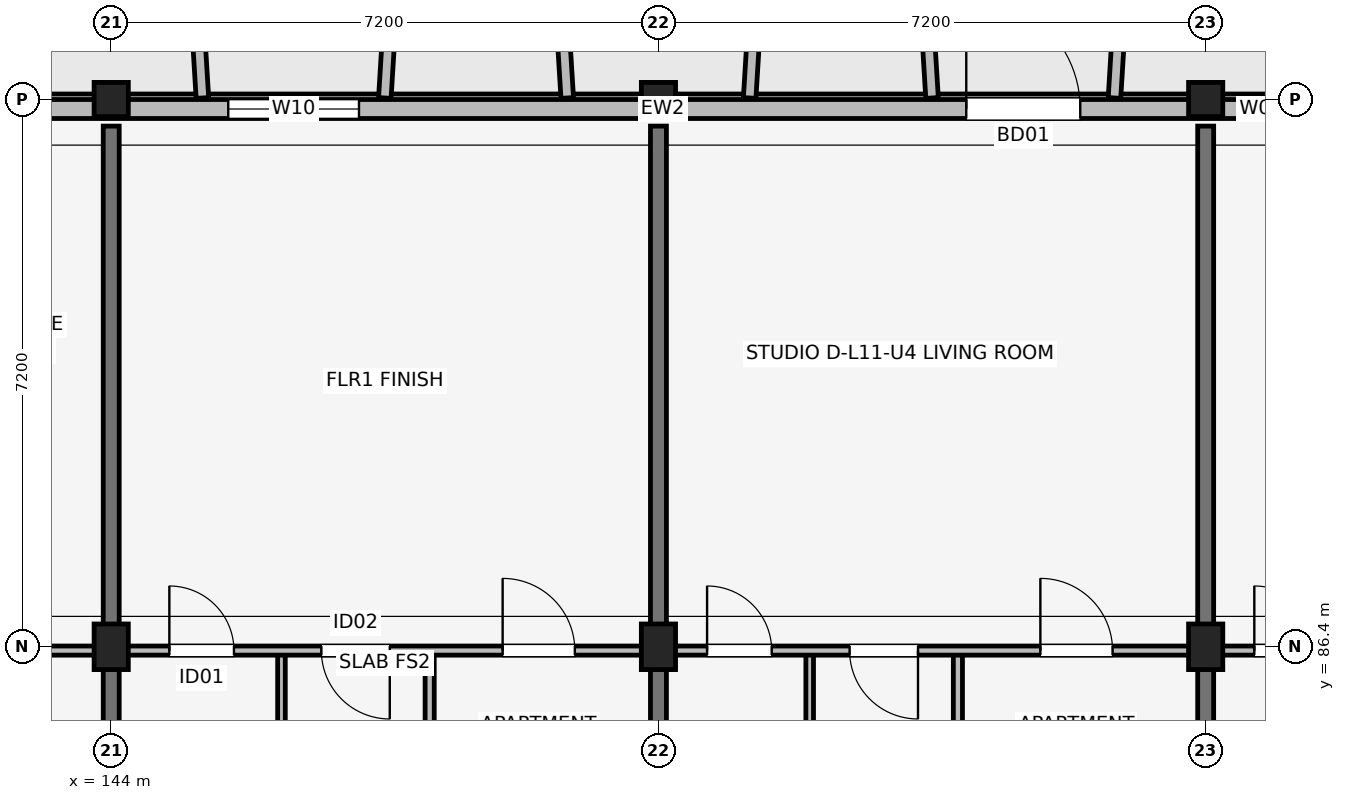
"""IFC4 building model, lengths in metres.
Left out: names, types, materials, properties, quantities, classifications, styles, units other than length and angle.
Written with IfcOpenShell. Run it as: python <this file> out.ifc"""

import sys

from ifc_helpers import new_model, si_unit, direction, frame, frame_2d, origin, origin_2d, place, context, subcontext, project, spatial, rectangle, extrude, element, fill, save


model = new_model("IFC4")
c1 = context("Model", 3, precision=1e-05, world=origin(), true_north=direction((0.0, 1.0)))
c2 = subcontext(c1, "Body", "Model", "MODEL_VIEW")
j1 = project(units=[si_unit("LENGTHUNIT", "METRE"), si_unit("PLANEANGLEUNIT", "RADIAN")], contexts=[c1])
p1 = place(None, origin())
s1 = spatial("IfcSite", under=j1, at=p1, CompositionType="ELEMENT")
p2 = place(p1, origin())
s2 = spatial("IfcBuilding", under=s1, at=p2, CompositionType="ELEMENT")
p3 = place(p2, frame((0.0, 0.0, 37.05)))
s3 = spatial("IfcBuildingStorey", under=s2, at=p3, CompositionType="ELEMENT", Elevation=37.05)
p4 = place(p3, frame((144.0, 86.4, 0.0), z_axis=(0.0, 0.0, 1.0), x_axis=(1.0, 0.0, 0.0)))
e1 = element("IfcColumn", 1, at=p4, inside=s3, PredefinedType="COLUMN", context=c2, shape_type="SweptSolid", body=[
    extrude(rectangle(XDim=0.45, YDim=0.6, at=origin_2d()), origin(), (0.0, 0.0, 1.0), 3.15),
])
p5 = place(p3, frame((144.0, 93.6, 0.0), z_axis=(0.0, 0.0, 1.0), x_axis=(1.0, 0.0, 0.0)))
e2 = element("IfcColumn", 2, at=p5, inside=s3, PredefinedType="COLUMN", context=c2, shape_type="SweptSolid", body=[
    extrude(rectangle(XDim=0.45, YDim=0.45, at=origin_2d()), origin(), (0.0, 0.0, 1.0), 3.15),
])
p6 = place(p3, frame((151.2, 86.4, 0.0), z_axis=(0.0, 0.0, 1.0), x_axis=(1.0, 0.0, 0.0)))
e3 = element("IfcColumn", 3, at=p6, inside=s3, PredefinedType="COLUMN", context=c2, shape_type="SweptSolid", body=[
    extrude(rectangle(XDim=0.45, YDim=0.6, at=origin_2d()), origin(), (0.0, 0.0, 1.0), 3.15),
])
p7 = place(p3, frame((151.2, 93.6, 0.0), z_axis=(0.0, 0.0, 1.0), x_axis=(1.0, 0.0, 0.0)))
e4 = element("IfcColumn", 4, at=p7, inside=s3, PredefinedType="COLUMN", context=c2, shape_type="SweptSolid", body=[
    extrude(rectangle(XDim=0.45, YDim=0.45, at=origin_2d()), origin(), (0.0, 0.0, 1.0), 3.15),
])
p8 = place(p3, frame((158.4, 86.4, 0.0), z_axis=(0.0, 0.0, 1.0), x_axis=(1.0, 0.0, 0.0)))
e5 = element("IfcColumn", 5, at=p8, inside=s3, PredefinedType="COLUMN", context=c2, shape_type="SweptSolid", body=[
    extrude(rectangle(XDim=0.45, YDim=0.6, at=origin_2d()), origin(), (0.0, 0.0, 1.0), 3.15),
])
p9 = place(p3, frame((158.4, 93.6, 0.0), z_axis=(0.0, 0.0, 1.0), x_axis=(1.0, 0.0, 0.0)))
e6 = element("IfcColumn", 6, at=p9, inside=s3, PredefinedType="COLUMN", context=c2, shape_type="SweptSolid", body=[
    extrude(rectangle(XDim=0.45, YDim=0.45, at=origin_2d()), origin(), (0.0, 0.0, 1.0), 3.15),
])
for number, where, z_axis, x_axis in (
    (7, (144.0, 83.85, 0.0), (0.0, 0.0, 1.0), (0.0, 1.0, 0.0)),
    (8, (151.2, 83.85, 0.0), (0.0, 0.0, 1.0), (0.0, 1.0, 0.0)),
    (9, (158.4, 83.85, 0.0), (0.0, 0.0, 1.0), (0.0, 1.0, 0.0)),
):
    element("IfcWall", number, at=place(p3, frame(where, z_axis=z_axis, x_axis=x_axis)), inside=s3, PredefinedType="SHEAR", context=c2, shape_type="SweptSolid", body=[
        extrude(rectangle(XDim=9.4, YDim=0.21, at=frame_2d((4.7, 0.0))), origin(), (0.0, 0.0, 1.0), 3.15),
    ])
p10 = place(p3, frame((162.8, 93.475, 0.0), z_axis=(0.0, 0.0, 1.0), x_axis=(-1.0, 0.0, 0.0)))
e10 = element("IfcWall", 10, at=p10, inside=s3, PredefinedType="SOLIDWALL", context=c2, shape_type="SweptSolid", body=[
    extrude(rectangle(XDim=30.4, YDim=0.25, at=frame_2d((15.2, 0.0))), origin(), (0.0, 0.0, 1.0), 2.45),
])
p11 = place(p10, frame((22.025, 0.0, 0.0), z_axis=(0.0, 0.0, 1.0), x_axis=(-1.0, 0.0, 0.0)))
e11 = element("IfcOpeningElement", 11, at=p11, cuts=e10, PredefinedType="OPENING", context=c2, shape_type="SweptSolid", body=[
    extrude(rectangle(XDim=1.65, YDim=2.15, at=frame_2d((0.825, 1.075))), frame((0.0, 0.135, 0.0), z_axis=(0.0, -1.0, 0.0), x_axis=(1.0, 0.0, 0.0)), (0.0, 0.0, 1.0), 0.27),
])
p12 = place(p10, frame((7.55, 0.0, 0.0), z_axis=(0.0, 0.0, 1.0), x_axis=(-1.0, 0.0, 0.0)))
e12 = element("IfcOpeningElement", 12, at=p12, cuts=e10, PredefinedType="OPENING", context=c2, shape_type="SweptSolid", body=[
    extrude(rectangle(XDim=1.5, YDim=2.15, at=frame_2d((0.75, 1.075))), frame((0.0, 0.135, 0.0), z_axis=(0.0, -1.0, 0.0), x_axis=(1.0, 0.0, 0.0)), (0.0, 0.0, 1.0), 0.27),
])
p13 = place(p10, frame((27.325, 0.0, 0.69)))
e13 = element("IfcOpeningElement", 13, at=p13, cuts=e10, PredefinedType="OPENING", context=c2, shape_type="SweptSolid", body=[
    extrude(rectangle(XDim=2.15, YDim=1.65, at=frame_2d((1.075, 0.825))), frame((0.0, 0.135, 0.0), z_axis=(0.0, -1.0, 0.0), x_axis=(1.0, 0.0, 0.0)), (0.0, 0.0, 1.0), 0.27),
])
p14 = place(p10, frame((23.925, 0.0, 0.75)))
e14 = element("IfcOpeningElement", 14, at=p14, cuts=e10, PredefinedType="OPENING", context=c2, shape_type="SweptSolid", body=[
    extrude(rectangle(XDim=0.72, YDim=1.35, at=frame_2d((0.36, 0.675))), frame((0.0, 0.135, 0.0), z_axis=(0.0, -1.0, 0.0), x_axis=(1.0, 0.0, 0.0)), (0.0, 0.0, 1.0), 0.27),
])
p15 = place(p10, frame((15.54, 0.0, 0.7)))
e15 = element("IfcOpeningElement", 15, at=p15, cuts=e10, PredefinedType="OPENING", context=c2, shape_type="SweptSolid", body=[
    extrude(rectangle(XDim=1.72, YDim=1.6, at=frame_2d((0.86, 0.8))), frame((0.0, 0.135, 0.0), z_axis=(0.0, -1.0, 0.0), x_axis=(1.0, 0.0, 0.0)), (0.0, 0.0, 1.0), 0.27),
])
p16 = place(p10, frame((3.367, 0.0, 0.75)))
e16 = element("IfcOpeningElement", 16, at=p16, cuts=e10, PredefinedType="OPENING", context=c2, shape_type="SweptSolid", body=[
    extrude(rectangle(XDim=0.6, YDim=1.25, at=frame_2d((0.3, 0.625))), frame((0.0, 0.135, 0.0), z_axis=(0.0, -1.0, 0.0), x_axis=(1.0, 0.0, 0.0)), (0.0, 0.0, 1.0), 0.27),
])
p17 = place(p10, frame((1.24, 0.0, 0.75)))
e17 = element("IfcOpeningElement", 17, at=p17, cuts=e10, PredefinedType="OPENING", context=c2, shape_type="SweptSolid", body=[
    extrude(rectangle(XDim=0.72, YDim=1.35, at=frame_2d((0.36, 0.675))), frame((0.0, 0.135, 0.0), z_axis=(0.0, -1.0, 0.0), x_axis=(1.0, 0.0, 0.0)), (0.0, 0.0, 1.0), 0.27),
])
for number, where, z_axis, x_axis in (
    (18, (145.2, 93.62, 0.0), (0.0, 0.0, 1.0), (-0.061, 0.998, 0.0)),
    (19, (147.6, 93.62, 0.0), (0.0, 0.0, 1.0), (0.061, 0.998, 0.0)),
    (20, (150.0, 93.62, 0.0), (0.0, 0.0, 1.0), (-0.061, 0.998, 0.0)),
):
    element("IfcWall", number, at=place(p3, frame(where, z_axis=z_axis, x_axis=x_axis)), inside=s3, PredefinedType="ELEMENTEDWALL", context=c2, shape_type="SweptSolid", body=[
        extrude(rectangle(XDim=1.964, YDim=0.165, at=frame_2d((0.982, 0.0))), origin(), (0.0, 0.0, 1.0), 2.45),
    ])
for number, where, z_axis, x_axis in (
    (21, (152.4, 93.62, 0.0), (0.0, 0.0, 1.0), (0.061, 0.998, 0.0)),
    (22, (154.8, 93.62, 0.0), (0.0, 0.0, 1.0), (-0.061, 0.998, 0.0)),
    (23, (157.2, 93.62, 0.0), (0.0, 0.0, 1.0), (0.061, 0.998, 0.0)),
):
    element("IfcWall", number, at=place(p3, frame(where, z_axis=z_axis, x_axis=x_axis)), inside=s3, PredefinedType="ELEMENTEDWALL", context=c2, shape_type="SweptSolid", body=[
        extrude(rectangle(XDim=1.964, YDim=0.165, at=frame_2d((0.982, 0.0))), origin(), (0.0, 0.0, 1.0), 2.53),
    ])
p18 = place(p3, frame((136.94, 86.35, 0.0), z_axis=(0.0, 0.0, 1.0), x_axis=(1.0, 0.0, 0.0)))
e24 = element("IfcWall", 24, at=p18, inside=s3, PredefinedType="PARTITIONING", context=c2, shape_type="SweptSolid", body=[
    extrude(rectangle(XDim=6.92, YDim=0.12, at=frame_2d((3.46, 0.0))), origin(), (0.0, 0.0, 1.0), 2.38),
])
p19 = place(p18, frame((1.475, 0.0, 0.0), z_axis=(0.0, 0.0, 1.0), x_axis=(-1.0, 0.0, 0.0)))
e25 = element("IfcOpeningElement", 25, at=p19, cuts=e24, PredefinedType="OPENING", context=c2, shape_type="SweptSolid", body=[
    extrude(rectangle(XDim=0.85, YDim=2.08, at=frame_2d((0.425, 1.04))), frame((0.0, 0.07, 0.0), z_axis=(0.0, -1.0, 0.0), x_axis=(1.0, 0.0, 0.0)), (0.0, 0.0, 1.0), 0.14),
])
p20 = place(p18, frame((2.775, 0.0, 0.0)))
e26 = element("IfcOpeningElement", 26, at=p20, cuts=e24, PredefinedType="OPENING", context=c2, shape_type="SweptSolid", body=[
    extrude(rectangle(XDim=0.9, YDim=2.08, at=frame_2d((0.45, 1.04))), frame((0.0, 0.07, 0.0), z_axis=(0.0, -1.0, 0.0), x_axis=(1.0, 0.0, 0.0)), (0.0, 0.0, 1.0), 0.14),
])
p21 = place(p18, frame((6.11, 0.0, 0.0), z_axis=(0.0, 0.0, 1.0), x_axis=(-1.0, 0.0, 0.0)))
e27 = element("IfcOpeningElement", 27, at=p21, cuts=e24, PredefinedType="OPENING", context=c2, shape_type="SweptSolid", body=[
    extrude(rectangle(XDim=0.95, YDim=2.08, at=frame_2d((0.475, 1.04))), frame((0.0, 0.07, 0.0), z_axis=(0.0, -1.0, 0.0), x_axis=(1.0, 0.0, 0.0)), (0.0, 0.0, 1.0), 0.14),
])
p22 = place(p3, frame((146.24, 83.7, 0.0), z_axis=(0.0, 0.0, 1.0), x_axis=(0.0, 1.0, 0.0)))
e28 = element("IfcWall", 28, at=p22, inside=s3, PredefinedType="PARTITIONING", context=c2, shape_type="SweptSolid", body=[
    extrude(rectangle(XDim=2.65, YDim=0.1, at=frame_2d((1.325, 0.0))), origin(), (0.0, 0.0, 1.0), 2.38),
])
p23 = place(p3, frame((148.19, 83.7, 0.0), z_axis=(0.0, 0.0, 1.0), x_axis=(0.0, 1.0, 0.0)))
e29 = element("IfcWall", 29, at=p23, inside=s3, PredefinedType="PARTITIONING", context=c2, shape_type="SweptSolid", body=[
    extrude(rectangle(XDim=2.65, YDim=0.12, at=frame_2d((1.325, 0.0))), origin(), (0.0, 0.0, 1.0), 2.38),
])
p24 = place(p3, frame((144.14, 86.35, 0.0), z_axis=(0.0, 0.0, 1.0), x_axis=(1.0, 0.0, 0.0)))
e30 = element("IfcWall", 30, at=p24, inside=s3, PredefinedType="PARTITIONING", context=c2, shape_type="SweptSolid", body=[
    extrude(rectangle(XDim=6.92, YDim=0.12, at=frame_2d((3.46, 0.0))), origin(), (0.0, 0.0, 1.0), 2.38),
])
p25 = place(p24, frame((0.625, 0.0, 0.0)))
e31 = element("IfcOpeningElement", 31, at=p25, cuts=e30, PredefinedType="OPENING", context=c2, shape_type="SweptSolid", body=[
    extrude(rectangle(XDim=0.85, YDim=2.08, at=frame_2d((0.425, 1.04))), frame((0.0, 0.07, 0.0), z_axis=(0.0, -1.0, 0.0), x_axis=(1.0, 0.0, 0.0)), (0.0, 0.0, 1.0), 0.14),
])
p26 = place(p24, frame((3.525, 0.0, 0.0), z_axis=(0.0, 0.0, 1.0), x_axis=(-1.0, 0.0, 0.0)))
e32 = element("IfcOpeningElement", 32, at=p26, cuts=e30, PredefinedType="OPENING", context=c2, shape_type="SweptSolid", body=[
    extrude(rectangle(XDim=0.9, YDim=2.08, at=frame_2d((0.45, 1.04))), frame((0.0, 0.07, 0.0), z_axis=(0.0, -1.0, 0.0), x_axis=(1.0, 0.0, 0.0)), (0.0, 0.0, 1.0), 0.14),
])
p27 = place(p24, frame((5.01, 0.0, 0.0)))
e33 = element("IfcOpeningElement", 33, at=p27, cuts=e30, PredefinedType="OPENING", context=c2, shape_type="SweptSolid", body=[
    extrude(rectangle(XDim=0.95, YDim=2.08, at=frame_2d((0.475, 1.04))), frame((0.0, 0.07, 0.0), z_axis=(0.0, -1.0, 0.0), x_axis=(1.0, 0.0, 0.0)), (0.0, 0.0, 1.0), 0.14),
])
p28 = place(p3, frame((153.19, 83.7, 0.0), z_axis=(0.0, 0.0, 1.0), x_axis=(0.0, 1.0, 0.0)))
e34 = element("IfcWall", 34, at=p28, inside=s3, PredefinedType="PARTITIONING", context=c2, shape_type="SweptSolid", body=[
    extrude(rectangle(XDim=2.65, YDim=0.1, at=frame_2d((1.325, 0.0))), origin(), (0.0, 0.0, 1.0), 2.38),
])
p29 = place(p3, frame((155.14, 83.7, 0.0), z_axis=(0.0, 0.0, 1.0), x_axis=(0.0, 1.0, 0.0)))
e35 = element("IfcWall", 35, at=p29, inside=s3, PredefinedType="PARTITIONING", context=c2, shape_type="SweptSolid", body=[
    extrude(rectangle(XDim=2.65, YDim=0.12, at=frame_2d((1.325, 0.0))), origin(), (0.0, 0.0, 1.0), 2.38),
])
p30 = place(p3, frame((151.34, 86.35, 0.0), z_axis=(0.0, 0.0, 1.0), x_axis=(1.0, 0.0, 0.0)))
e36 = element("IfcWall", 36, at=p30, inside=s3, PredefinedType="PARTITIONING", context=c2, shape_type="SweptSolid", body=[
    extrude(rectangle(XDim=6.92, YDim=0.12, at=frame_2d((3.46, 0.0))), origin(), (0.0, 0.0, 1.0), 2.38),
])
p31 = place(p30, frame((0.5, 0.0, 0.0)))
e37 = element("IfcOpeningElement", 37, at=p31, cuts=e36, PredefinedType="OPENING", context=c2, shape_type="SweptSolid", body=[
    extrude(rectangle(XDim=0.85, YDim=2.08, at=frame_2d((0.425, 1.04))), frame((0.0, 0.07, 0.0), z_axis=(0.0, -1.0, 0.0), x_axis=(1.0, 0.0, 0.0)), (0.0, 0.0, 1.0), 0.14),
])
p32 = place(p30, frame((3.275, 0.0, 0.0), z_axis=(0.0, 0.0, 1.0), x_axis=(-1.0, 0.0, 0.0)))
e38 = element("IfcOpeningElement", 38, at=p32, cuts=e36, PredefinedType="OPENING", context=c2, shape_type="SweptSolid", body=[
    extrude(rectangle(XDim=0.9, YDim=2.08, at=frame_2d((0.45, 1.04))), frame((0.0, 0.07, 0.0), z_axis=(0.0, -1.0, 0.0), x_axis=(1.0, 0.0, 0.0)), (0.0, 0.0, 1.0), 0.14),
])
p33 = place(p30, frame((4.885, 0.0, 0.0)))
e39 = element("IfcOpeningElement", 39, at=p33, cuts=e36, PredefinedType="OPENING", context=c2, shape_type="SweptSolid", body=[
    extrude(rectangle(XDim=0.95, YDim=2.08, at=frame_2d((0.475, 1.04))), frame((0.0, 0.07, 0.0), z_axis=(0.0, -1.0, 0.0), x_axis=(1.0, 0.0, 0.0)), (0.0, 0.0, 1.0), 0.14),
])
p34 = place(p3, frame((158.54, 86.35, 0.0), z_axis=(0.0, 0.0, 1.0), x_axis=(1.0, 0.0, 0.0)))
e40 = element("IfcWall", 40, at=p34, inside=s3, PredefinedType="PARTITIONING", context=c2, shape_type="SweptSolid", body=[
    extrude(rectangle(XDim=6.92, YDim=0.12, at=frame_2d((3.46, 0.0))), origin(), (0.0, 0.0, 1.0), 2.38),
])
p35 = place(p34, frame((0.5, 0.0, 0.0)))
e41 = element("IfcOpeningElement", 41, at=p35, cuts=e40, PredefinedType="OPENING", context=c2, shape_type="SweptSolid", body=[
    extrude(rectangle(XDim=0.85, YDim=2.08, at=frame_2d((0.425, 1.04))), frame((0.0, 0.07, 0.0), z_axis=(0.0, -1.0, 0.0), x_axis=(1.0, 0.0, 0.0)), (0.0, 0.0, 1.0), 0.14),
])
p36 = place(p34, frame((3.155, 0.0, 0.0), z_axis=(0.0, 0.0, 1.0), x_axis=(-1.0, 0.0, 0.0)))
e42 = element("IfcOpeningElement", 42, at=p36, cuts=e40, PredefinedType="OPENING", context=c2, shape_type="SweptSolid", body=[
    extrude(rectangle(XDim=0.9, YDim=2.08, at=frame_2d((0.45, 1.04))), frame((0.0, 0.07, 0.0), z_axis=(0.0, -1.0, 0.0), x_axis=(1.0, 0.0, 0.0)), (0.0, 0.0, 1.0), 0.14),
])
p37 = place(p34, frame((3.91, 0.0, 0.0)))
e43 = element("IfcOpeningElement", 43, at=p37, cuts=e40, PredefinedType="OPENING", context=c2, shape_type="SweptSolid", body=[
    extrude(rectangle(XDim=0.95, YDim=2.08, at=frame_2d((0.475, 1.04))), frame((0.0, 0.07, 0.0), z_axis=(0.0, -1.0, 0.0), x_axis=(1.0, 0.0, 0.0)), (0.0, 0.0, 1.0), 0.14),
])
p38 = place(p12, origin())
e44 = element("IfcDoor", 44, at=p38, inside=s3, OperationType="SINGLE_SWING_RIGHT", PredefinedType="DOOR", context=c2, shape_type="SweptSolid", body=[
    extrude(rectangle(XDim=1.5, YDim=2.15, at=frame_2d((0.75, 1.075))), frame((0.0, 0.025, 0.0), z_axis=(0.0, -1.0, 0.0), x_axis=(1.0, 0.0, 0.0)), (0.0, 0.0, 1.0), 0.05),
])
fill(e12, e44)
p39 = place(p15, origin())
e45 = element("IfcWindow", 45, at=p39, inside=s3, PartitioningType="SINGLE_PANEL", PredefinedType="WINDOW", context=c2, shape_type="SweptSolid", body=[
    extrude(rectangle(XDim=1.72, YDim=1.6, at=frame_2d((0.86, 0.8))), frame((0.0, 0.03, 0.0), z_axis=(0.0, -1.0, 0.0), x_axis=(1.0, 0.0, 0.0)), (0.0, 0.0, 1.0), 0.06),
])
fill(e15, e45)
p40 = place(p16, origin())
e46 = element("IfcWindow", 46, at=p40, inside=s3, PartitioningType="SINGLE_PANEL", PredefinedType="WINDOW", context=c2, shape_type="SweptSolid", body=[
    extrude(rectangle(XDim=0.6, YDim=1.25, at=frame_2d((0.3, 0.625))), frame((0.0, 0.03, 0.0), z_axis=(0.0, -1.0, 0.0), x_axis=(1.0, 0.0, 0.0)), (0.0, 0.0, 1.0), 0.06),
])
fill(e16, e46)
p41 = place(p25, origin())
e47 = element("IfcDoor", 47, at=p41, inside=s3, OperationType="SINGLE_SWING_LEFT", PredefinedType="DOOR", context=c2, shape_type="SweptSolid", body=[
    extrude(rectangle(XDim=0.85, YDim=2.08, at=frame_2d((0.425, 1.04))), frame((0.0, 0.025, 0.0), z_axis=(0.0, -1.0, 0.0), x_axis=(1.0, 0.0, 0.0)), (0.0, 0.0, 1.0), 0.05),
])
fill(e31, e47)
p42 = place(p26, origin())
e48 = element("IfcDoor", 48, at=p42, inside=s3, OperationType="SINGLE_SWING_RIGHT", PredefinedType="DOOR", context=c2, shape_type="SweptSolid", body=[
    extrude(rectangle(XDim=0.9, YDim=2.08, at=frame_2d((0.45, 1.04))), frame((0.0, 0.025, 0.0), z_axis=(0.0, -1.0, 0.0), x_axis=(1.0, 0.0, 0.0)), (0.0, 0.0, 1.0), 0.05),
])
fill(e32, e48)
p43 = place(p27, origin())
e49 = element("IfcDoor", 49, at=p43, inside=s3, OperationType="SINGLE_SWING_LEFT", PredefinedType="DOOR", context=c2, shape_type="SweptSolid", body=[
    extrude(rectangle(XDim=0.95, YDim=2.08, at=frame_2d((0.475, 1.04))), frame((0.0, 0.025, 0.0), z_axis=(0.0, -1.0, 0.0), x_axis=(1.0, 0.0, 0.0)), (0.0, 0.0, 1.0), 0.05),
])
fill(e33, e49)
p44 = place(p31, origin())
e50 = element("IfcDoor", 50, at=p44, inside=s3, OperationType="SINGLE_SWING_LEFT", PredefinedType="DOOR", context=c2, shape_type="SweptSolid", body=[
    extrude(rectangle(XDim=0.85, YDim=2.08, at=frame_2d((0.425, 1.04))), frame((0.0, 0.025, 0.0), z_axis=(0.0, -1.0, 0.0), x_axis=(1.0, 0.0, 0.0)), (0.0, 0.0, 1.0), 0.05),
])
fill(e37, e50)
p45 = place(p32, origin())
e51 = element("IfcDoor", 51, at=p45, inside=s3, OperationType="SINGLE_SWING_RIGHT", PredefinedType="DOOR", context=c2, shape_type="SweptSolid", body=[
    extrude(rectangle(XDim=0.9, YDim=2.08, at=frame_2d((0.45, 1.04))), frame((0.0, 0.025, 0.0), z_axis=(0.0, -1.0, 0.0), x_axis=(1.0, 0.0, 0.0)), (0.0, 0.0, 1.0), 0.05),
])
fill(e38, e51)
p46 = place(p33, origin())
e52 = element("IfcDoor", 52, at=p46, inside=s3, OperationType="SINGLE_SWING_LEFT", PredefinedType="DOOR", context=c2, shape_type="SweptSolid", body=[
    extrude(rectangle(XDim=0.95, YDim=2.08, at=frame_2d((0.475, 1.04))), frame((0.0, 0.025, 0.0), z_axis=(0.0, -1.0, 0.0), x_axis=(1.0, 0.0, 0.0)), (0.0, 0.0, 1.0), 0.05),
])
fill(e39, e52)
p47 = place(p35, origin())
e53 = element("IfcDoor", 53, at=p47, inside=s3, OperationType="SINGLE_SWING_LEFT", PredefinedType="DOOR", context=c2, shape_type="SweptSolid", body=[
    extrude(rectangle(XDim=0.85, YDim=2.08, at=frame_2d((0.425, 1.04))), frame((0.0, 0.025, 0.0), z_axis=(0.0, -1.0, 0.0), x_axis=(1.0, 0.0, 0.0)), (0.0, 0.0, 1.0), 0.05),
])
fill(e41, e53)
save(model, sys.argv[1])
